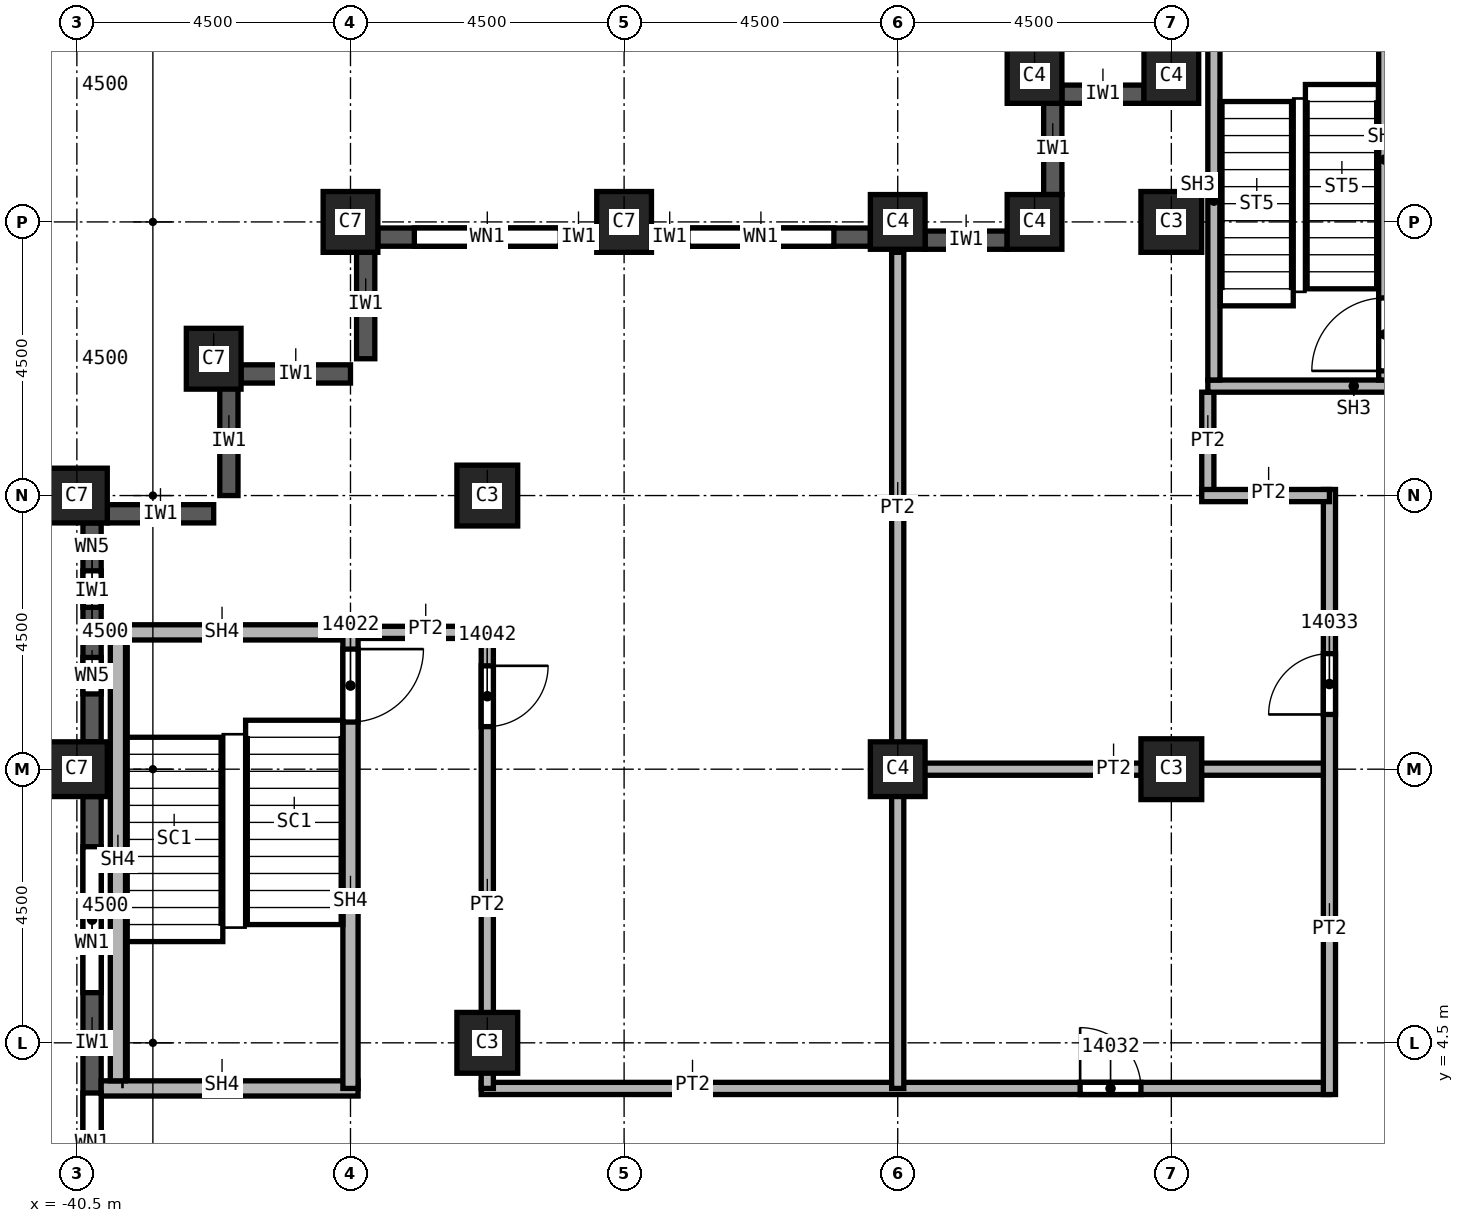
"""IFC4 building model, lengths in metres.
Left out: names, types, materials, properties, quantities, classifications, styles, units other than length and angle.
Written with IfcOpenShell. Run it as: python <this file> out.ifc"""

import sys

from ifc_helpers import new_model, si_unit, direction, frame, frame_2d, origin, origin_2d, place, context, subcontext, project, spatial, rectangle, extrude, element, fill, save


model = new_model("IFC4")
c1 = context("Model", 3, precision=1e-05, world=origin(), true_north=direction((0.0, 1.0)))
c2 = subcontext(c1, "Body", "Model", "MODEL_VIEW")
j1 = project(units=[si_unit("LENGTHUNIT", "METRE"), si_unit("PLANEANGLEUNIT", "RADIAN")], contexts=[c1])
p1 = place(None, origin())
s1 = spatial("IfcSite", under=j1, at=p1, CompositionType="ELEMENT")
p2 = place(p1, origin())
s2 = spatial("IfcBuilding", under=s1, at=p2, CompositionType="ELEMENT")
p3 = place(p2, frame((0.0, 0.0, 220.0)))
s3 = spatial("IfcBuildingStorey", under=s2, at=p3, CompositionType="ELEMENT", Elevation=220.0)
for number, where, z_axis, x_axis in (
    (1, (-40.5, 9.0, 0.0), (0.0, 0.0, 1.0), (0.0, 1.0, 0.0)),
    (2, (-40.5, 13.5, 0.0), (0.0, 0.0, 1.0), (0.0, 1.0, 0.0)),
    (3, (-38.25, 15.75, 0.0), (0.0, 0.0, 1.0), (1.0, 0.0, 0.0)),
    (4, (-31.5, 18.0, 0.0), (0.0, 0.0, 1.0), (1.0, 0.0, 0.0)),
    (5, (-36.0, 18.0, 0.0), (0.0, 0.0, 1.0), (1.0, 0.0, 0.0)),
):
    element("IfcColumn", number, at=place(p3, frame(where, z_axis=z_axis, x_axis=x_axis)), inside=s3, PredefinedType="COLUMN", context=c2, shape_type="SweptSolid", body=[
        extrude(rectangle(XDim=0.9, YDim=1.0, at=origin_2d()), origin(), (0.0, 0.0, 1.0), 3.72),
    ])
for number, where, z_axis, x_axis in (
    (6, (-33.75, 4.5, 0.0), (0.0, 0.0, 1.0), (1.0, 0.0, 0.0)),
    (7, (-33.75, 13.5, 0.0), (0.0, 0.0, 1.0), (1.0, 0.0, 0.0)),
    (8, (-22.5, 9.0, 0.0), (0.0, 0.0, 1.0), (1.0, 0.0, 0.0)),
    (9, (-22.5, 18.0, 0.0), (0.0, 0.0, 1.0), (1.0, 0.0, 0.0)),
):
    element("IfcColumn", number, at=place(p3, frame(where, z_axis=z_axis, x_axis=x_axis)), inside=s3, PredefinedType="COLUMN", context=c2, shape_type="SweptSolid", body=[
        extrude(rectangle(XDim=1.0, YDim=1.0, at=origin_2d()), origin(), (0.0, 0.0, 1.0), 3.72),
    ])
for number, where, z_axis, x_axis in (
    (10, (-27.0, 9.0, 0.0), (0.0, 0.0, 1.0), (1.0, 0.0, 0.0)),
    (11, (-27.0, 18.0, 0.0), (0.0, 0.0, 1.0), (1.0, 0.0, 0.0)),
    (12, (-22.5, 20.4, 0.0), (0.0, 0.0, 1.0), (1.0, 0.0, 0.0)),
    (13, (-24.75, 20.4, 0.0), (0.0, 0.0, 1.0), (1.0, 0.0, 0.0)),
    (14, (-24.75, 18.0, 0.0), (0.0, 0.0, 1.0), (1.0, 0.0, 0.0)),
):
    element("IfcColumn", number, at=place(p3, frame(where, z_axis=z_axis, x_axis=x_axis)), inside=s3, PredefinedType="COLUMN", context=c2, shape_type="SweptSolid", body=[
        extrude(rectangle(XDim=0.9, YDim=0.9, at=origin_2d()), origin(), (0.0, 0.0, 1.0), 3.72),
    ])
for number, where, z_axis, x_axis in (
    (15, (-35.75, 17.55, 0.0), (0.0, 0.0, 1.0), (0.0, -1.0, 0.0)),
    (16, (-37.8, 15.5, 0.0), (0.0, 0.0, 1.0), (1.0, 0.0, 0.0)),
    (17, (-38.0, 15.3, 0.0), (0.0, 0.0, 1.0), (0.0, -1.0, 0.0)),
):
    element("IfcWall", number, at=place(p3, frame(where, z_axis=z_axis, x_axis=x_axis)), inside=s3, PredefinedType="SOLIDWALL", context=c2, shape_type="SweptSolid", body=[
        extrude(rectangle(XDim=1.8, YDim=0.3, at=frame_2d((0.9, 0.0))), origin(), (0.0, 0.0, 1.0), 3.12),
    ])
p4 = place(p3, frame((-40.0, 13.2, 0.0), z_axis=(0.0, 0.0, 1.0), x_axis=(1.0, 0.0, 0.0)))
e18 = element("IfcWall", 18, at=p4, inside=s3, PredefinedType="SOLIDWALL", context=c2, shape_type="SweptSolid", body=[
    extrude(rectangle(XDim=1.75, YDim=0.3, at=frame_2d((0.875, 0.0))), origin(), (0.0, 0.0, 1.0), 3.12),
])
p5 = place(p3, frame((-22.95, 20.1, 0.0), z_axis=(0.0, 0.0, 1.0), x_axis=(-1.0, 0.0, 0.0)))
e19 = element("IfcWall", 19, at=p5, inside=s3, PredefinedType="SOLIDWALL", context=c2, shape_type="SweptSolid", body=[
    extrude(rectangle(XDim=1.35, YDim=0.3, at=frame_2d((0.675, 0.0))), origin(), (0.0, 0.0, 1.0), 3.12),
])
p6 = place(p3, frame((-24.45, 19.95, 0.0), z_axis=(0.0, 0.0, 1.0), x_axis=(0.0, -1.0, 0.0)))
e20 = element("IfcWall", 20, at=p6, inside=s3, PredefinedType="SOLIDWALL", context=c2, shape_type="SweptSolid", body=[
    extrude(rectangle(XDim=1.5, YDim=0.3, at=frame_2d((0.75, 0.0))), origin(), (0.0, 0.0, 1.0), 3.12),
])
p7 = place(p3, frame((-25.2, 17.7, 0.0), z_axis=(0.0, 0.0, 1.0), x_axis=(-1.0, 0.0, 0.0)))
e21 = element("IfcWall", 21, at=p7, inside=s3, PredefinedType="SOLIDWALL", context=c2, shape_type="SweptSolid", body=[
    extrude(rectangle(XDim=1.35, YDim=0.3, at=frame_2d((0.675, 0.0))), origin(), (0.0, 0.0, 1.0), 3.12),
])
p8 = place(p3, frame((-27.45, 17.75, 0.0), z_axis=(0.0, 0.0, 1.0), x_axis=(-1.0, 0.0, 0.0)))
e22 = element("IfcWall", 22, at=p8, inside=s3, PredefinedType="SOLIDWALL", context=c2, shape_type="SweptSolid", body=[
    extrude(rectangle(XDim=3.6, YDim=0.3, at=frame_2d((1.8, 0.0))), origin(), (0.0, 0.0, 1.0), 3.12),
])
p9 = place(p8, frame((0.6, 0.0, 0.8)))
e23 = element("IfcOpeningElement", 23, at=p9, cuts=e22, PredefinedType="OPENING", context=c2, shape_type="SweptSolid", body=[
    extrude(rectangle(XDim=2.4, YDim=1.95, at=frame_2d((1.2, 0.975))), frame((0.0, 0.15, 0.0), z_axis=(0.0, -1.0, 0.0), x_axis=(1.0, 0.0, 0.0)), (0.0, 0.0, 1.0), 0.3),
])
p10 = place(p3, frame((-31.95, 17.75, 0.0), z_axis=(0.0, 0.0, 1.0), x_axis=(-1.0, 0.0, 0.0)))
e24 = element("IfcWall", 24, at=p10, inside=s3, PredefinedType="SOLIDWALL", context=c2, shape_type="SweptSolid", body=[
    extrude(rectangle(XDim=3.6, YDim=0.3, at=frame_2d((1.8, 0.0))), origin(), (0.0, 0.0, 1.0), 3.12),
])
p11 = place(p10, frame((0.6, 0.0, 0.8)))
e25 = element("IfcOpeningElement", 25, at=p11, cuts=e24, PredefinedType="OPENING", context=c2, shape_type="SweptSolid", body=[
    extrude(rectangle(XDim=2.4, YDim=1.95, at=frame_2d((1.2, 0.975))), frame((0.0, 0.15, 0.0), z_axis=(0.0, -1.0, 0.0), x_axis=(1.0, 0.0, 0.0)), (0.0, 0.0, 1.0), 0.3),
])
p12 = place(p3, frame((-40.25, 13.05, 0.0), z_axis=(0.0, 0.0, 1.0), x_axis=(0.0, -1.0, 0.0)))
e26 = element("IfcWall", 26, at=p12, inside=s3, PredefinedType="SOLIDWALL", context=c2, shape_type="SweptSolid", body=[
    extrude(rectangle(XDim=3.6, YDim=0.3, at=frame_2d((1.8, 0.0))), origin(), (0.0, 0.0, 1.0), 3.12),
])
p13 = place(p12, frame((0.788, 0.0, 0.8)))
e27 = element("IfcOpeningElement", 27, at=p13, cuts=e26, PredefinedType="OPENING", context=c2, shape_type="SweptSolid", body=[
    extrude(rectangle(XDim=0.6, YDim=1.95, at=frame_2d((0.3, 0.975))), frame((0.0, 0.15, 0.0), z_axis=(0.0, -1.0, 0.0), x_axis=(1.0, 0.0, 0.0)), (0.0, 0.0, 1.0), 0.3),
])
p14 = place(p12, frame((2.212, 0.0, 0.8)))
e28 = element("IfcOpeningElement", 28, at=p14, cuts=e26, PredefinedType="OPENING", context=c2, shape_type="SweptSolid", body=[
    extrude(rectangle(XDim=0.6, YDim=1.95, at=frame_2d((0.3, 0.975))), frame((0.0, 0.15, 0.0), z_axis=(0.0, -1.0, 0.0), x_axis=(1.0, 0.0, 0.0)), (0.0, 0.0, 1.0), 0.3),
])
p15 = place(p3, frame((-40.25, 8.55, 0.0), z_axis=(0.0, 0.0, 1.0), x_axis=(0.0, -1.0, 0.0)))
e29 = element("IfcWall", 29, at=p15, inside=s3, PredefinedType="SOLIDWALL", context=c2, shape_type="SweptSolid", body=[
    extrude(rectangle(XDim=8.1, YDim=0.3, at=frame_2d((4.05, 0.0))), origin(), (0.0, 0.0, 1.0), 3.12),
])
p16 = place(p15, frame((0.825, 0.0, 0.8)))
e30 = element("IfcOpeningElement", 30, at=p16, cuts=e29, PredefinedType="OPENING", context=c2, shape_type="SweptSolid", body=[
    extrude(rectangle(XDim=2.4, YDim=1.95, at=frame_2d((1.2, 0.975))), frame((0.0, 0.15, 0.0), z_axis=(0.0, -1.0, 0.0), x_axis=(1.0, 0.0, 0.0)), (0.0, 0.0, 1.0), 0.3),
])
p17 = place(p15, frame((4.875, 0.0, 0.8)))
e31 = element("IfcOpeningElement", 31, at=p17, cuts=e29, PredefinedType="OPENING", context=c2, shape_type="SweptSolid", body=[
    extrude(rectangle(XDim=2.4, YDim=1.95, at=frame_2d((1.2, 0.975))), frame((0.0, 0.15, 0.0), z_axis=(0.0, -1.0, 0.0), x_axis=(1.0, 0.0, 0.0)), (0.0, 0.0, 1.0), 0.3),
])
p18 = place(p3, frame((-36.0, 11.25, 0.0), z_axis=(0.0, 0.0, 1.0), x_axis=(1.0, 0.0, 0.0)))
e32 = element("IfcWall", 32, at=p18, inside=s3, PredefinedType="PARTITIONING", context=c2, shape_type="SweptSolid", body=[
    extrude(rectangle(XDim=2.35, YDim=0.2, at=frame_2d((1.175, 0.0))), origin(), (0.0, 0.0, 1.0), 3.72),
])
p19 = place(p3, frame((-33.85, 3.75, 0.0), z_axis=(0.0, 0.0, 1.0), x_axis=(1.0, 0.0, 0.0)))
e33 = element("IfcWall", 33, at=p19, inside=s3, PredefinedType="PARTITIONING", context=c2, shape_type="SweptSolid", body=[
    extrude(rectangle(XDim=13.95, YDim=0.2, at=frame_2d((6.975, 0.0))), origin(), (0.0, 0.0, 1.0), 3.72),
])
p20 = place(p19, frame((9.85, 0.0, 0.0)))
e34 = element("IfcOpeningElement", 34, at=p20, cuts=e33, PredefinedType="OPENING", context=c2, shape_type="SweptSolid", body=[
    extrude(rectangle(XDim=1.0, YDim=2.1, at=frame_2d((0.5, 1.05))), frame((0.0, 0.1, 0.0), z_axis=(0.0, -1.0, 0.0), x_axis=(1.0, 0.0, 0.0)), (0.0, 0.0, 1.0), 0.2),
])
p21 = place(p3, frame((-33.75, 11.25, 0.0), z_axis=(0.0, 0.0, 1.0), x_axis=(0.0, -1.0, 0.0)))
e35 = element("IfcWall", 35, at=p21, inside=s3, PredefinedType="PARTITIONING", context=c2, shape_type="SweptSolid", body=[
    extrude(rectangle(XDim=7.5, YDim=0.2, at=frame_2d((3.75, 0.0))), origin(), (0.0, 0.0, 1.0), 3.72),
])
p22 = place(p21, frame((0.55, 0.0, 0.0)))
e36 = element("IfcOpeningElement", 36, at=p22, cuts=e35, PredefinedType="OPENING", context=c2, shape_type="SweptSolid", body=[
    extrude(rectangle(XDim=1.0, YDim=2.1, at=frame_2d((0.5, 1.05))), frame((0.0, 0.1, 0.0), z_axis=(0.0, -1.0, 0.0), x_axis=(1.0, 0.0, 0.0)), (0.0, 0.0, 1.0), 0.2),
])
p23 = place(p3, frame((-27.1, 9.0, 0.0), z_axis=(0.0, 0.0, 1.0), x_axis=(1.0, 0.0, 0.0)))
e37 = element("IfcWall", 37, at=p23, inside=s3, PredefinedType="PARTITIONING", context=c2, shape_type="SweptSolid", body=[
    extrude(rectangle(XDim=7.2, YDim=0.2, at=frame_2d((3.6, 0.0))), origin(), (0.0, 0.0, 1.0), 3.72),
])
p24 = place(p3, frame((-27.0, 3.75, 0.0), z_axis=(0.0, 0.0, 1.0), x_axis=(0.0, 1.0, 0.0)))
e38 = element("IfcWall", 38, at=p24, inside=s3, PredefinedType="PARTITIONING", context=c2, shape_type="SweptSolid", body=[
    extrude(rectangle(XDim=13.75, YDim=0.2, at=frame_2d((6.875, 0.0))), origin(), (0.0, 0.0, 1.0), 3.72),
])
p25 = place(p3, frame((-21.9, 13.5, 0.0), z_axis=(0.0, 0.0, 1.0), x_axis=(0.0, 1.0, 0.0)))
e39 = element("IfcWall", 39, at=p25, inside=s3, PredefinedType="PARTITIONING", context=c2, shape_type="SweptSolid", body=[
    extrude(rectangle(XDim=1.7, YDim=0.2, at=frame_2d((0.85, 0.0))), origin(), (0.0, 0.0, 1.0), 3.72),
])
p26 = place(p3, frame((-19.9, 3.65, 0.0), z_axis=(0.0, 0.0, 1.0), x_axis=(0.0, 1.0, 0.0)))
e40 = element("IfcWall", 40, at=p26, inside=s3, PredefinedType="PARTITIONING", context=c2, shape_type="SweptSolid", body=[
    extrude(rectangle(XDim=9.95, YDim=0.2, at=frame_2d((4.975, 0.0))), origin(), (0.0, 0.0, 1.0), 3.72),
])
p27 = place(p26, frame((6.25, 0.0, 0.0)))
e41 = element("IfcOpeningElement", 41, at=p27, cuts=e40, PredefinedType="OPENING", context=c2, shape_type="SweptSolid", body=[
    extrude(rectangle(XDim=1.0, YDim=2.1, at=frame_2d((0.5, 1.05))), frame((0.0, 0.1, 0.0), z_axis=(0.0, -1.0, 0.0), x_axis=(1.0, 0.0, 0.0)), (0.0, 0.0, 1.0), 0.2),
])
p28 = place(p3, frame((-19.9, 13.5, 0.0), z_axis=(0.0, 0.0, 1.0), x_axis=(-1.0, 0.0, 0.0)))
e42 = element("IfcWall", 42, at=p28, inside=s3, PredefinedType="PARTITIONING", context=c2, shape_type="SweptSolid", body=[
    extrude(rectangle(XDim=2.1, YDim=0.2, at=frame_2d((1.05, 0.0))), origin(), (0.0, 0.0, 1.0), 3.72),
])
p29 = place(p3, frame((-40.1, 3.75, 0.0), z_axis=(0.0, 0.0, 1.0), x_axis=(1.0, 0.0, 0.0)))
e43 = element("IfcWall", 43, at=p29, inside=s3, PredefinedType="SOLIDWALL", context=c2, shape_type="SweptSolid", body=[
    extrude(rectangle(XDim=4.225, YDim=0.25, at=frame_2d((2.113, 0.0))), origin(), (0.0, 0.0, 1.0), 3.72),
])
p30 = place(p3, frame((-40.1, 11.25, 0.0), z_axis=(0.0, 0.0, 1.0), x_axis=(1.0, 0.0, 0.0)))
e44 = element("IfcWall", 44, at=p30, inside=s3, PredefinedType="SOLIDWALL", context=c2, shape_type="SweptSolid", body=[
    extrude(rectangle(XDim=4.1, YDim=0.25, at=frame_2d((2.05, 0.0))), origin(), (0.0, 0.0, 1.0), 3.72),
])
p31 = place(p3, frame((-36.0, 11.375, 0.0), z_axis=(0.0, 0.0, 1.0), x_axis=(0.0, -1.0, 0.0)))
e45 = element("IfcWall", 45, at=p31, inside=s3, PredefinedType="SOLIDWALL", context=c2, shape_type="SweptSolid", body=[
    extrude(rectangle(XDim=7.625, YDim=0.25, at=frame_2d((3.812, 0.0))), origin(), (0.0, 0.0, 1.0), 3.72),
])
p32 = place(p31, frame((0.4, 0.0, 0.0)))
e46 = element("IfcOpeningElement", 46, at=p32, cuts=e45, PredefinedType="OPENING", context=c2, shape_type="SweptSolid", body=[
    extrude(rectangle(XDim=1.2, YDim=2.1, at=frame_2d((0.6, 1.05))), frame((0.0, 0.125, 0.0), z_axis=(0.0, -1.0, 0.0), x_axis=(1.0, 0.0, 0.0)), (0.0, 0.0, 1.0), 0.25),
])
p33 = place(p3, frame((-21.9, 15.3, 0.0), z_axis=(0.0, 0.0, 1.0), x_axis=(1.0, 0.0, 0.0)))
e47 = element("IfcWall", 47, at=p33, inside=s3, PredefinedType="SOLIDWALL", context=c2, shape_type="SweptSolid", body=[
    extrude(rectangle(XDim=8.275, YDim=0.2, at=frame_2d((4.137, 0.0))), origin(), (0.0, 0.0, 1.0), 3.72),
])
p34 = place(p33, frame((4.8, 0.0, 0.0)))
e48 = element("IfcOpeningElement", 48, at=p34, cuts=e47, PredefinedType="OPENING", context=c2, shape_type="SweptSolid", body=[
    extrude(rectangle(XDim=1.2, YDim=2.1, at=frame_2d((0.6, 1.05))), frame((0.0, 0.1, 0.0), z_axis=(0.0, -1.0, 0.0), x_axis=(1.0, 0.0, 0.0)), (0.0, 0.0, 1.0), 0.2),
])
p35 = place(p3, frame((-21.8, 15.4, 0.0), z_axis=(0.0, 0.0, 1.0), x_axis=(0.0, 1.0, 0.0)))
e49 = element("IfcWall", 49, at=p35, inside=s3, PredefinedType="SOLIDWALL", context=c2, shape_type="SweptSolid", body=[
    extrude(rectangle(XDim=5.9, YDim=0.2, at=frame_2d((2.95, 0.0))), origin(), (0.0, 0.0, 1.0), 3.72),
])
p36 = place(p3, frame((-18.99, 15.4, 0.0), z_axis=(0.0, 0.0, 1.0), x_axis=(0.0, 1.0, 0.0)))
e50 = element("IfcWall", 50, at=p36, inside=s3, PredefinedType="SOLIDWALL", context=c2, shape_type="SweptSolid", body=[
    extrude(rectangle(XDim=5.9, YDim=0.2, at=frame_2d((2.95, 0.0))), origin(), (0.0, 0.0, 1.0), 3.72),
])
p37 = place(p36, frame((0.15, 0.0, 0.0)))
e51 = element("IfcOpeningElement", 51, at=p37, cuts=e50, PredefinedType="OPENING", context=c2, shape_type="SweptSolid", body=[
    extrude(rectangle(XDim=1.2, YDim=2.1, at=frame_2d((0.6, 1.05))), frame((0.0, 0.1, 0.0), z_axis=(0.0, -1.0, 0.0), x_axis=(1.0, 0.0, 0.0)), (0.0, 0.0, 1.0), 0.2),
])
p38 = place(p3, frame((-39.825, 3.875, 0.0), z_axis=(0.0, 0.0, 1.0), x_axis=(0.0, 1.0, 0.0)))
e52 = element("IfcWall", 52, at=p38, inside=s3, PredefinedType="SOLIDWALL", context=c2, shape_type="SweptSolid", body=[
    extrude(rectangle(XDim=7.25, YDim=0.25, at=frame_2d((3.625, 0.0))), origin(), (0.0, 0.0, 1.0), 3.72),
])
p39 = place(p9, origin())
e53 = element("IfcWindow", 53, at=p39, inside=s3, PartitioningType="SINGLE_PANEL", PredefinedType="WINDOW", context=c2, shape_type="SweptSolid", body=[
    extrude(rectangle(XDim=2.4, YDim=1.95, at=frame_2d((1.2, 0.975))), frame((0.0, 0.03, 0.0), z_axis=(0.0, -1.0, 0.0), x_axis=(1.0, 0.0, 0.0)), (0.0, 0.0, 1.0), 0.06),
])
fill(e23, e53)
p40 = place(p11, origin())
e54 = element("IfcWindow", 54, at=p40, inside=s3, PartitioningType="SINGLE_PANEL", PredefinedType="WINDOW", context=c2, shape_type="SweptSolid", body=[
    extrude(rectangle(XDim=2.4, YDim=1.95, at=frame_2d((1.2, 0.975))), frame((0.0, 0.03, 0.0), z_axis=(0.0, -1.0, 0.0), x_axis=(1.0, 0.0, 0.0)), (0.0, 0.0, 1.0), 0.06),
])
fill(e25, e54)
p41 = place(p16, origin())
e55 = element("IfcWindow", 55, at=p41, inside=s3, PartitioningType="SINGLE_PANEL", PredefinedType="WINDOW", context=c2, shape_type="SweptSolid", body=[
    extrude(rectangle(XDim=2.4, YDim=1.95, at=frame_2d((1.2, 0.975))), frame((0.0, 0.03, 0.0), z_axis=(0.0, -1.0, 0.0), x_axis=(1.0, 0.0, 0.0)), (0.0, 0.0, 1.0), 0.06),
])
fill(e30, e55)
p42 = place(p17, origin())
e56 = element("IfcWindow", 56, at=p42, inside=s3, PartitioningType="SINGLE_PANEL", PredefinedType="WINDOW", context=c2, shape_type="SweptSolid", body=[
    extrude(rectangle(XDim=2.4, YDim=1.95, at=frame_2d((1.2, 0.975))), frame((0.0, 0.03, 0.0), z_axis=(0.0, -1.0, 0.0), x_axis=(1.0, 0.0, 0.0)), (0.0, 0.0, 1.0), 0.06),
])
fill(e31, e56)
p43 = place(p32, origin())
e57 = element("IfcDoor", 57, at=p43, inside=s3, OperationType="SINGLE_SWING_LEFT", PredefinedType="DOOR", context=c2, shape_type="SweptSolid", body=[
    extrude(rectangle(XDim=1.2, YDim=2.1, at=frame_2d((0.6, 1.05))), frame((0.0, 0.025, 0.0), z_axis=(0.0, -1.0, 0.0), x_axis=(1.0, 0.0, 0.0)), (0.0, 0.0, 1.0), 0.05),
])
fill(e46, e57)
p44 = place(p20, origin())
e58 = element("IfcDoor", 58, at=p44, inside=s3, OperationType="SINGLE_SWING_LEFT", PredefinedType="DOOR", context=c2, shape_type="SweptSolid", body=[
    extrude(rectangle(XDim=1.0, YDim=2.1, at=frame_2d((0.5, 1.05))), frame((0.0, 0.025, 0.0), z_axis=(0.0, -1.0, 0.0), x_axis=(1.0, 0.0, 0.0)), (0.0, 0.0, 1.0), 0.05),
])
fill(e34, e58)
p45 = place(p27, origin())
e59 = element("IfcDoor", 59, at=p45, inside=s3, OperationType="SINGLE_SWING_RIGHT", PredefinedType="DOOR", context=c2, shape_type="SweptSolid", body=[
    extrude(rectangle(XDim=1.0, YDim=2.1, at=frame_2d((0.5, 1.05))), frame((0.0, 0.025, 0.0), z_axis=(0.0, -1.0, 0.0), x_axis=(1.0, 0.0, 0.0)), (0.0, 0.0, 1.0), 0.05),
])
fill(e41, e59)
p46 = place(p22, origin())
e60 = element("IfcDoor", 60, at=p46, inside=s3, OperationType="SINGLE_SWING_LEFT", PredefinedType="DOOR", context=c2, shape_type="SweptSolid", body=[
    extrude(rectangle(XDim=1.0, YDim=2.1, at=frame_2d((0.5, 1.05))), frame((0.0, 0.025, 0.0), z_axis=(0.0, -1.0, 0.0), x_axis=(1.0, 0.0, 0.0)), (0.0, 0.0, 1.0), 0.05),
])
fill(e36, e60)
p47 = place(p37, origin())
e61 = element("IfcDoor", 61, at=p47, inside=s3, OperationType="SINGLE_SWING_LEFT", PredefinedType="DOOR", context=c2, shape_type="SweptSolid", body=[
    extrude(rectangle(XDim=1.2, YDim=2.1, at=frame_2d((0.6, 1.05))), frame((0.0, 0.025, 0.0), z_axis=(0.0, -1.0, 0.0), x_axis=(1.0, 0.0, 0.0)), (0.0, 0.0, 1.0), 0.05),
])
fill(e51, e61)
p48 = place(p13, origin())
e62 = element("IfcWindow", 62, at=p48, inside=s3, PartitioningType="SINGLE_PANEL", PredefinedType="WINDOW", context=c2, shape_type="SweptSolid", body=[
    extrude(rectangle(XDim=0.6, YDim=1.95, at=frame_2d((0.3, 0.975))), frame((0.0, 0.03, 0.0), z_axis=(0.0, -1.0, 0.0), x_axis=(1.0, 0.0, 0.0)), (0.0, 0.0, 1.0), 0.06),
])
fill(e27, e62)
p49 = place(p14, origin())
e63 = element("IfcWindow", 63, at=p49, inside=s3, PartitioningType="SINGLE_PANEL", PredefinedType="WINDOW", context=c2, shape_type="SweptSolid", body=[
    extrude(rectangle(XDim=0.6, YDim=1.95, at=frame_2d((0.3, 0.975))), frame((0.0, 0.03, 0.0), z_axis=(0.0, -1.0, 0.0), x_axis=(1.0, 0.0, 0.0)), (0.0, 0.0, 1.0), 0.06),
])
fill(e28, e63)
save(model, sys.argv[1])
